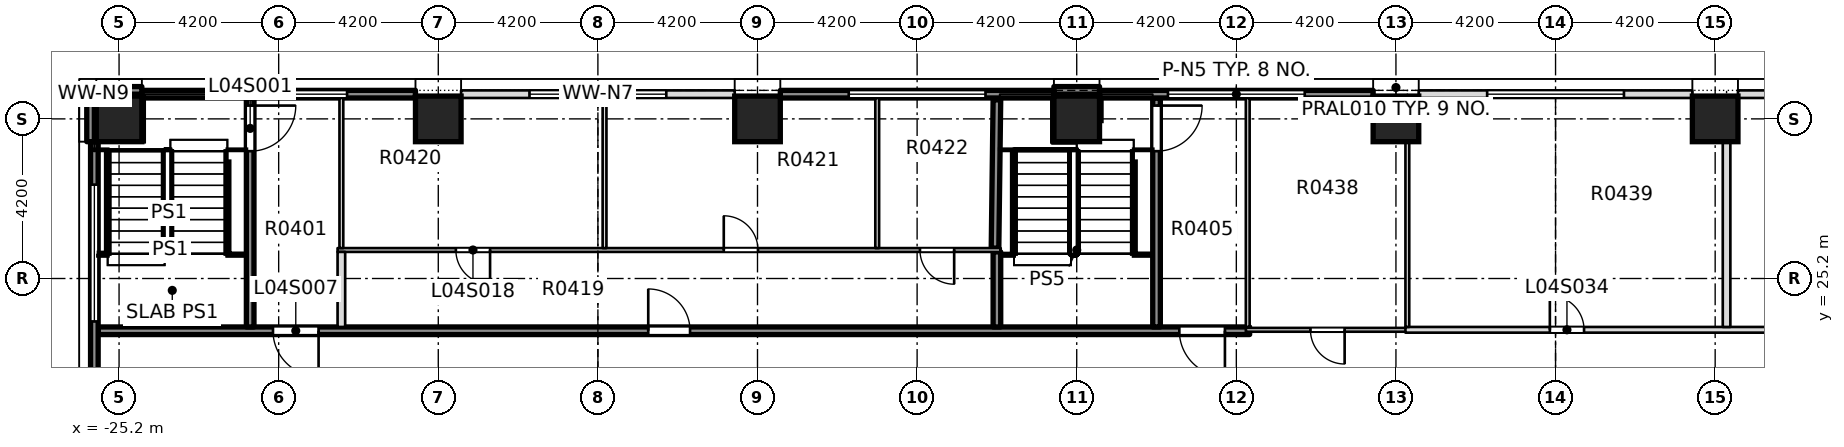
"""IFC4 building model, lengths in metres.
Left out: names, types, materials, properties, quantities, classifications, styles, units other than length and angle.
Written with IfcOpenShell. Run it as: python <this file> out.ifc"""

import sys

from ifc_helpers import new_model, si_unit, direction, frame, frame_2d, origin, origin_2d, place, context, subcontext, project, spatial, rectangle, extrude, element, fill, save


model = new_model("IFC4")
c1 = context("Model", 3, precision=1e-05, world=origin(), true_north=direction((0.0, 1.0)))
c2 = subcontext(c1, "Body", "Model", "MODEL_VIEW")
j1 = project(units=[si_unit("LENGTHUNIT", "METRE"), si_unit("PLANEANGLEUNIT", "RADIAN")], contexts=[c1])
p1 = place(None, origin())
s1 = spatial("IfcSite", under=j1, at=p1, CompositionType="ELEMENT")
p2 = place(p1, origin())
s2 = spatial("IfcBuilding", under=s1, at=p2, CompositionType="ELEMENT")
p3 = place(p2, frame((0.0, 0.0, 25.0)))
s3 = spatial("IfcBuildingStorey", under=s2, at=p3, CompositionType="ELEMENT", Elevation=25.0)
for number, where, z_axis, x_axis in (
    (1, (-25.2, 29.4, 0.0), (0.0, 0.0, 1.0), (1.0, 0.0, 0.0)),
    (2, (-16.8, 29.4, 0.0), (0.0, 0.0, 1.0), (1.0, 0.0, 0.0)),
    (3, (-8.4, 29.4, 0.0), (0.0, 0.0, 1.0), (1.0, 0.0, 0.0)),
    (4, (0.0, 29.4, 0.0), (0.0, 0.0, 1.0), (1.0, 0.0, 0.0)),
    (5, (8.4, 29.4, 0.0), (0.0, 0.0, 1.0), (1.0, 0.0, 0.0)),
    (6, (16.8, 29.4, 0.0), (0.0, 0.0, 1.0), (1.0, 0.0, 0.0)),
):
    element("IfcColumn", number, at=place(p3, frame(where, z_axis=z_axis, x_axis=x_axis)), inside=s3, PredefinedType="COLUMN", context=c2, shape_type="SweptSolid", body=[
        extrude(rectangle(XDim=1.2, YDim=1.2, at=origin_2d()), origin(), (0.0, 0.0, 1.0), 5.0),
    ])
p4 = place(p3, frame((-25.75, 23.825, 0.0), z_axis=(0.0, 0.0, 1.0), x_axis=(1.0, 0.0, 0.0)))
e7 = element("IfcWall", 7, at=p4, inside=s3, PredefinedType="SOLIDWALL", context=c2, shape_type="SweptSolid", body=[
    extrude(rectangle(XDim=30.3, YDim=0.2, at=frame_2d((15.15, 0.0))), origin(), (0.0, 0.0, 1.0), 4.6),
])
p5 = place(p4, frame((4.6, 0.0, 0.0)))
e8 = element("IfcOpeningElement", 8, at=p5, cuts=e7, PredefinedType="OPENING", context=c2, shape_type="SweptSolid", body=[
    extrude(rectangle(XDim=1.2, YDim=2.1, at=frame_2d((0.6, 1.05))), frame((0.0, 0.11, 0.0), z_axis=(0.0, -1.0, 0.0), x_axis=(1.0, 0.0, 0.0)), (0.0, 0.0, 1.0), 0.22),
])
p6 = place(p4, frame((28.45, 0.0, 0.0)))
e9 = element("IfcOpeningElement", 9, at=p6, cuts=e7, PredefinedType="OPENING", context=c2, shape_type="SweptSolid", body=[
    extrude(rectangle(XDim=1.2, YDim=2.1, at=frame_2d((0.6, 1.05))), frame((0.0, 0.11, 0.0), z_axis=(0.0, -1.0, 0.0), x_axis=(1.0, 0.0, 0.0)), (0.0, 0.0, 1.0), 0.22),
])
p7 = place(p4, frame((14.475, 0.0, 0.0)))
e10 = element("IfcOpeningElement", 10, at=p7, cuts=e7, PredefinedType="OPENING", context=c2, shape_type="SweptSolid", body=[
    extrude(rectangle(XDim=1.1, YDim=2.1, at=frame_2d((0.55, 1.05))), frame((0.0, 0.11, 0.0), z_axis=(0.0, -1.0, 0.0), x_axis=(1.0, 0.0, 0.0)), (0.0, 0.0, 1.0), 0.22),
])
p8 = place(p3, frame((4.45, 23.85, 0.0), z_axis=(0.0, 0.0, 1.0), x_axis=(1.0, 0.0, 0.0)))
e11 = element("IfcWall", 11, at=p8, inside=s3, PredefinedType="PARTITIONING", context=c2, shape_type="SweptSolid", body=[
    extrude(rectangle(XDim=4.3, YDim=0.1, at=frame_2d((2.15, 0.0))), origin(), (0.0, 0.0, 1.0), 4.6),
])
p9 = place(p8, frame((1.7, 0.0, 0.0)))
e12 = element("IfcOpeningElement", 12, at=p9, cuts=e11, PredefinedType="OPENING", context=c2, shape_type="SweptSolid", body=[
    extrude(rectangle(XDim=0.9, YDim=2.1, at=frame_2d((0.45, 1.05))), frame((0.0, 0.06, 0.0), z_axis=(0.0, -1.0, 0.0), x_axis=(1.0, 0.0, 0.0)), (0.0, 0.0, 1.0), 0.12),
])
p10 = place(p3, frame((8.65, 23.85, 0.0), z_axis=(0.0, 0.0, 1.0), x_axis=(1.0, 0.0, 0.0)))
e13 = element("IfcWall", 13, at=p10, inside=s3, PredefinedType="PARTITIONING", context=c2, shape_type="SweptSolid", body=[
    extrude(rectangle(XDim=27.6, YDim=0.15, at=frame_2d((13.8, 0.0))), origin(), (0.0, 0.0, 1.0), 4.6),
])
p11 = place(p10, frame((3.8, 0.0, 0.0)))
e14 = element("IfcOpeningElement", 14, at=p11, cuts=e13, PredefinedType="OPENING", context=c2, shape_type="SweptSolid", body=[
    extrude(rectangle(XDim=0.9, YDim=2.1, at=frame_2d((0.45, 1.05))), frame((0.0, 0.085, 0.0), z_axis=(0.0, -1.0, 0.0), x_axis=(1.0, 0.0, 0.0)), (0.0, 0.0, 1.0), 0.17),
])
p12 = place(p10, frame((17.525, 0.0, 0.0)))
e15 = element("IfcOpeningElement", 15, at=p12, cuts=e13, PredefinedType="OPENING", context=c2, shape_type="SweptSolid", body=[
    extrude(rectangle(XDim=0.9, YDim=2.1, at=frame_2d((0.45, 1.05))), frame((0.0, 0.085, 0.0), z_axis=(0.0, -1.0, 0.0), x_axis=(1.0, 0.0, 0.0)), (0.0, 0.0, 1.0), 0.17),
])
p13 = place(p3, frame((-19.45, 25.95, 0.0), z_axis=(0.0, 0.0, 1.0), x_axis=(1.0, 0.0, 0.0)))
e16 = element("IfcWall", 16, at=p13, inside=s3, PredefinedType="PARTITIONING", context=c2, shape_type="SweptSolid", body=[
    extrude(rectangle(XDim=17.45, YDim=0.1, at=frame_2d((8.725, 0.0))), origin(), (0.0, 0.0, 1.0), 4.6),
])
p14 = place(p13, frame((3.113, 0.0, 0.0)))
e17 = element("IfcOpeningElement", 17, at=p14, cuts=e16, PredefinedType="OPENING", context=c2, shape_type="SweptSolid", body=[
    extrude(rectangle(XDim=0.9, YDim=2.1, at=frame_2d((0.45, 1.05))), frame((0.0, 0.06, 0.0), z_axis=(0.0, -1.0, 0.0), x_axis=(1.0, 0.0, 0.0)), (0.0, 0.0, 1.0), 0.12),
])
p15 = place(p13, frame((10.162, 0.0, 0.0)))
e18 = element("IfcOpeningElement", 18, at=p15, cuts=e16, PredefinedType="OPENING", context=c2, shape_type="SweptSolid", body=[
    extrude(rectangle(XDim=0.9, YDim=2.1, at=frame_2d((0.45, 1.05))), frame((0.0, 0.06, 0.0), z_axis=(0.0, -1.0, 0.0), x_axis=(1.0, 0.0, 0.0)), (0.0, 0.0, 1.0), 0.12),
])
p16 = place(p13, frame((15.325, 0.0, 0.0)))
e19 = element("IfcOpeningElement", 19, at=p16, cuts=e16, PredefinedType="OPENING", context=c2, shape_type="SweptSolid", body=[
    extrude(rectangle(XDim=0.9, YDim=2.1, at=frame_2d((0.45, 1.05))), frame((0.0, 0.06, 0.0), z_axis=(0.0, -1.0, 0.0), x_axis=(1.0, 0.0, 0.0)), (0.0, 0.0, 1.0), 0.12),
])
p17 = place(p3, frame((-21.75, 23.925, 0.0), z_axis=(0.0, 0.0, 1.0), x_axis=(0.0, 1.0, 0.0)))
e20 = element("IfcWall", 20, at=p17, inside=s3, PredefinedType="SOLIDWALL", context=c2, shape_type="SweptSolid", body=[
    extrude(rectangle(XDim=6.025, YDim=0.2, at=frame_2d((3.012, 0.0))), origin(), (0.0, 0.0, 1.0), 4.6),
])
p18 = place(p17, frame((4.625, 0.0, 0.0)))
e21 = element("IfcOpeningElement", 21, at=p18, cuts=e20, PredefinedType="OPENING", context=c2, shape_type="SweptSolid", body=[
    extrude(rectangle(XDim=1.2, YDim=2.1, at=frame_2d((0.6, 1.05))), frame((0.0, 0.11, 0.0), z_axis=(0.0, -1.0, 0.0), x_axis=(1.0, 0.0, 0.0)), (0.0, 0.0, 1.0), 0.22),
])
p19 = place(p3, frame((-19.35, 23.925, 0.0), z_axis=(0.0, 0.0, 1.0), x_axis=(0.0, 1.0, 0.0)))
e22 = element("IfcWall", 22, at=p19, inside=s3, PredefinedType="PARTITIONING", context=c2, shape_type="SweptSolid", body=[
    extrude(rectangle(XDim=1.975, YDim=0.2, at=frame_2d((0.987, 0.0))), origin(), (0.0, 0.0, 1.0), 4.6),
])
for number, where, z_axis, x_axis in (
    (23, (-19.35, 26.0, 0.0), (0.0, 0.0, 1.0), (0.0, 1.0, 0.0)),
    (24, (-12.425, 26.0, 0.0), (0.0, 0.0, 1.0), (0.0, 1.0, 0.0)),
    (25, (-5.25, 26.0, 0.0), (0.0, 0.0, 1.0), (0.0, 1.0, 0.0)),
):
    element("IfcWall", number, at=place(p3, frame(where, z_axis=z_axis, x_axis=x_axis)), inside=s3, PredefinedType="PARTITIONING", context=c2, shape_type="SweptSolid", body=[
        extrude(rectangle(XDim=3.95, YDim=0.1, at=frame_2d((1.975, 0.0))), origin(), (0.0, 0.0, 1.0), 4.6),
    ])
p20 = place(p3, frame((-2.1, 23.925, 0.0), z_axis=(0.0, 0.0, 1.0), x_axis=(0.0, 1.0, 0.0)))
e26 = element("IfcWall", 26, at=p20, inside=s3, PredefinedType="SOLIDWALL", context=c2, shape_type="SweptSolid", body=[
    extrude(rectangle(XDim=1.975, YDim=0.2, at=frame_2d((0.987, 0.0))), origin(), (0.0, 0.0, 1.0), 4.6),
])
p21 = place(p3, frame((-2.15, 26.0, 0.0), z_axis=(0.0, 0.0, 1.0), x_axis=(0.012832297537, 0.99991766268, 0.0)))
e27 = element("IfcWall", 27, at=p21, inside=s3, PredefinedType="SOLIDWALL", context=c2, shape_type="SweptSolid", body=[
    extrude(rectangle(XDim=3.9, YDim=0.2, at=frame_2d((1.95, 0.0))), origin(), (0.0, 0.0, 1.0), 4.6),
])
p22 = place(p3, frame((2.1, 23.925, 0.0), z_axis=(0.0, 0.0, 1.0), x_axis=(0.0, 1.0, 0.0)))
e28 = element("IfcWall", 28, at=p22, inside=s3, PredefinedType="SOLIDWALL", context=c2, shape_type="SweptSolid", body=[
    extrude(rectangle(XDim=6.025, YDim=0.2, at=frame_2d((3.012, 0.0))), origin(), (0.0, 0.0, 1.0), 4.6),
])
p23 = place(p22, frame((4.625, 0.0, 0.0)))
e29 = element("IfcOpeningElement", 29, at=p23, cuts=e28, PredefinedType="OPENING", context=c2, shape_type="SweptSolid", body=[
    extrude(rectangle(XDim=1.2, YDim=2.1, at=frame_2d((0.6, 1.05))), frame((0.0, 0.11, 0.0), z_axis=(0.0, -1.0, 0.0), x_axis=(1.0, 0.0, 0.0)), (0.0, 0.0, 1.0), 0.22),
])
for number, where, z_axis, x_axis in (
    (30, (4.5, 23.925, 0.0), (0.0, 0.0, 1.0), (0.0, 1.0, 0.0)),
    (31, (8.7, 23.925, 0.0), (0.0, 0.0, 1.0), (0.0, 1.0, 0.0)),
):
    element("IfcWall", number, at=place(p3, frame(where, z_axis=z_axis, x_axis=x_axis)), inside=s3, PredefinedType="PARTITIONING", context=c2, shape_type="SweptSolid", body=[
        extrude(rectangle(XDim=6.025, YDim=0.1, at=frame_2d((3.012, 0.0))), origin(), (0.0, 0.0, 1.0), 4.6),
    ])
p24 = place(p3, frame((17.1, 23.925, 0.0), z_axis=(0.0, 0.0, 1.0), x_axis=(0.0, 1.0, 0.0)))
e32 = element("IfcWall", 32, at=p24, inside=s3, PredefinedType="PARTITIONING", context=c2, shape_type="SweptSolid", body=[
    extrude(rectangle(XDim=6.025, YDim=0.2, at=frame_2d((3.012, 0.0))), origin(), (0.0, 0.0, 1.0), 4.6),
])
p25 = place(p3, frame((24.6, 30.05, 0.0), z_axis=(0.0, 0.0, 1.0), x_axis=(-1.0, 0.0, 0.0)))
e33 = element("IfcWall", 33, at=p25, inside=s3, PredefinedType="STANDARD", context=c2, shape_type="SweptSolid", body=[
    extrude(rectangle(XDim=7.2, YDim=0.2, at=frame_2d((3.6, 0.0))), origin(), (0.0, 0.0, 1.0), 4.6),
])
p26 = place(p25, frame((1.8, 0.0, 0.9)))
e34 = element("IfcOpeningElement", 34, at=p26, cuts=e33, PredefinedType="OPENING", context=c2, shape_type="SweptSolid", body=[
    extrude(rectangle(XDim=3.6, YDim=2.8, at=frame_2d((1.8, 1.4))), frame((0.0, 0.11, 0.0), z_axis=(0.0, -1.0, 0.0), x_axis=(1.0, 0.0, 0.0)), (0.0, 0.0, 1.0), 0.22),
])
p27 = place(p3, frame((16.2, 30.05, 0.0), z_axis=(0.0, 0.0, 1.0), x_axis=(-1.0, 0.0, 0.0)))
e35 = element("IfcWall", 35, at=p27, inside=s3, PredefinedType="STANDARD", context=c2, shape_type="SweptSolid", body=[
    extrude(rectangle(XDim=7.2, YDim=0.2, at=frame_2d((3.6, 0.0))), origin(), (0.0, 0.0, 1.0), 4.6),
])
p28 = place(p27, frame((1.8, 0.0, 0.9)))
e36 = element("IfcOpeningElement", 36, at=p28, cuts=e35, PredefinedType="OPENING", context=c2, shape_type="SweptSolid", body=[
    extrude(rectangle(XDim=3.6, YDim=2.8, at=frame_2d((1.8, 1.4))), frame((0.0, 0.11, 0.0), z_axis=(0.0, -1.0, 0.0), x_axis=(1.0, 0.0, 0.0)), (0.0, 0.0, 1.0), 0.22),
])
p29 = place(p3, frame((0.6, 30.05, 0.0), z_axis=(0.0, 0.0, 1.0), x_axis=(1.0, 0.0, 0.0)))
e37 = element("IfcWall", 37, at=p29, inside=s3, PredefinedType="SOLIDWALL", context=c2, shape_type="SweptSolid", body=[
    extrude(rectangle(XDim=7.2, YDim=0.2, at=frame_2d((3.6, 0.0))), origin(), (0.0, 0.0, 1.0), 4.6),
])
p30 = place(p29, frame((1.8, 0.0, 0.9)))
e38 = element("IfcOpeningElement", 38, at=p30, cuts=e37, PredefinedType="OPENING", context=c2, shape_type="SweptSolid", body=[
    extrude(rectangle(XDim=3.6, YDim=2.8, at=frame_2d((1.8, 1.4))), frame((0.0, 0.11, 0.0), z_axis=(0.0, -1.0, 0.0), x_axis=(1.0, 0.0, 0.0)), (0.0, 0.0, 1.0), 0.22),
])
p31 = place(p3, frame((-7.8, 30.05, 0.0), z_axis=(0.0, 0.0, 1.0), x_axis=(1.0, 0.0, 0.0)))
e39 = element("IfcWall", 39, at=p31, inside=s3, PredefinedType="SOLIDWALL", context=c2, shape_type="SweptSolid", body=[
    extrude(rectangle(XDim=7.2, YDim=0.2, at=frame_2d((3.6, 0.0))), origin(), (0.0, 0.0, 1.0), 4.6),
])
p32 = place(p31, frame((1.8, 0.0, 0.9)))
e40 = element("IfcOpeningElement", 40, at=p32, cuts=e39, PredefinedType="OPENING", context=c2, shape_type="SweptSolid", body=[
    extrude(rectangle(XDim=3.6, YDim=2.8, at=frame_2d((1.8, 1.4))), frame((0.0, 0.11, 0.0), z_axis=(0.0, -1.0, 0.0), x_axis=(1.0, 0.0, 0.0)), (0.0, 0.0, 1.0), 0.22),
])
p33 = place(p3, frame((-9.0, 30.05, 0.0), z_axis=(0.0, 0.0, 1.0), x_axis=(-1.0, 0.0, 0.0)))
e41 = element("IfcWall", 41, at=p33, inside=s3, PredefinedType="STANDARD", context=c2, shape_type="SweptSolid", body=[
    extrude(rectangle(XDim=7.2, YDim=0.2, at=frame_2d((3.6, 0.0))), origin(), (0.0, 0.0, 1.0), 4.6),
])
p34 = place(p33, frame((1.8, 0.0, 0.9)))
e42 = element("IfcOpeningElement", 42, at=p34, cuts=e41, PredefinedType="OPENING", context=c2, shape_type="SweptSolid", body=[
    extrude(rectangle(XDim=3.6, YDim=2.8, at=frame_2d((1.8, 1.4))), frame((0.0, 0.11, 0.0), z_axis=(0.0, -1.0, 0.0), x_axis=(1.0, 0.0, 0.0)), (0.0, 0.0, 1.0), 0.22),
])
p35 = place(p3, frame((-24.6, 30.05, 0.0), z_axis=(0.0, 0.0, 1.0), x_axis=(1.0, 0.0, 0.0)))
e43 = element("IfcWall", 43, at=p35, inside=s3, PredefinedType="SOLIDWALL", context=c2, shape_type="SweptSolid", body=[
    extrude(rectangle(XDim=7.2, YDim=0.2, at=frame_2d((3.6, 0.0))), origin(), (0.0, 0.0, 1.0), 4.6),
])
p36 = place(p35, frame((1.8, 0.0, 0.9)))
e44 = element("IfcOpeningElement", 44, at=p36, cuts=e43, PredefinedType="OPENING", context=c2, shape_type="SweptSolid", body=[
    extrude(rectangle(XDim=3.6, YDim=2.8, at=frame_2d((1.8, 1.4))), frame((0.0, 0.11, 0.0), z_axis=(0.0, -1.0, 0.0), x_axis=(1.0, 0.0, 0.0)), (0.0, 0.0, 1.0), 0.22),
])
p37 = place(p3, frame((-25.8, 30.05, 0.0), z_axis=(0.0, 0.0, 1.0), x_axis=(-1.0, 0.0, 0.0)))
e45 = element("IfcWall", 45, at=p37, inside=s3, PredefinedType="STANDARD", context=c2, shape_type="SweptSolid", body=[
    extrude(rectangle(XDim=0.15, YDim=0.2, at=frame_2d((0.075, 0.0))), origin(), (0.0, 0.0, 1.0), 4.6),
])
p38 = place(p3, frame((-25.85, 21.6, 0.0), z_axis=(0.0, 0.0, 1.0), x_axis=(0.0, 1.0, 0.0)))
e46 = element("IfcWall", 46, at=p38, inside=s3, PredefinedType="SOLIDWALL", context=c2, shape_type="SweptSolid", body=[
    extrude(rectangle(XDim=7.2, YDim=0.2, at=frame_2d((3.6, 0.0))), origin(), (0.0, 0.0, 1.0), 4.6),
])
p39 = place(p38, frame((2.47, 0.0, 0.9)))
e47 = element("IfcOpeningElement", 47, at=p39, cuts=e46, PredefinedType="OPENING", context=c2, shape_type="SweptSolid", body=[
    extrude(rectangle(XDim=3.6, YDim=2.8, at=frame_2d((1.8, 1.4))), frame((0.0, 0.11, 0.0), z_axis=(0.0, -1.0, 0.0), x_axis=(1.0, 0.0, 0.0)), (0.0, 0.0, 1.0), 0.22),
])
p40 = place(p3, frame((-25.95, 28.8, 0.0), z_axis=(0.0, 0.0, 1.0), x_axis=(0.0, 1.0, 0.0)))
e48 = element("IfcWall", 48, at=p40, inside=s3, PredefinedType="SOLIDWALL", context=c2, shape_type="SweptSolid", body=[
    extrude(rectangle(XDim=1.1, YDim=0.2, at=frame_2d((0.55, 0.0))), origin(), (0.0, 0.0, 1.0), 4.6),
])
p41 = place(p3, frame((-25.8, 30.15, 0.0), z_axis=(0.0, 0.0, 1.0), x_axis=(1.0, 0.0, 0.0)))
e49 = element("IfcWall", 49, at=p41, inside=s3, PredefinedType="SOLIDWALL", context=c2, shape_type="SweptSolid", body=[
    extrude(rectangle(XDim=1.2, YDim=0.2, at=frame_2d((0.6, 0.0))), origin(), (0.0, 0.0, 1.0), 4.6),
])
p42 = place(p3, frame((-0.6, 30.15, 0.0), z_axis=(0.0, 0.0, 1.0), x_axis=(1.0, 0.0, 0.0)))
e50 = element("IfcWall", 50, at=p42, inside=s3, PredefinedType="SOLIDWALL", context=c2, shape_type="SweptSolid", body=[
    extrude(rectangle(XDim=1.2, YDim=0.2, at=frame_2d((0.6, 0.0))), origin(), (0.0, 0.0, 1.0), 4.6),
])
p43 = place(p18, origin())
e51 = element("IfcDoor", 51, at=p43, inside=s3, OperationType="DOUBLE_DOOR_SINGLE_SWING", PredefinedType="DOOR", context=c2, shape_type="SweptSolid", body=[
    extrude(rectangle(XDim=1.2, YDim=2.1, at=frame_2d((0.6, 1.05))), frame((0.0, 0.025, 0.0), z_axis=(0.0, -1.0, 0.0), x_axis=(1.0, 0.0, 0.0)), (0.0, 0.0, 1.0), 0.05),
])
fill(e21, e51)
p44 = place(p23, origin())
e52 = element("IfcDoor", 52, at=p44, inside=s3, OperationType="DOUBLE_DOOR_SINGLE_SWING", PredefinedType="DOOR", context=c2, shape_type="SweptSolid", body=[
    extrude(rectangle(XDim=1.2, YDim=2.1, at=frame_2d((0.6, 1.05))), frame((0.0, 0.025, 0.0), z_axis=(0.0, -1.0, 0.0), x_axis=(1.0, 0.0, 0.0)), (0.0, 0.0, 1.0), 0.05),
])
fill(e29, e52)
p45 = place(p5, origin())
e53 = element("IfcDoor", 53, at=p45, inside=s3, OperationType="SINGLE_SWING_LEFT", PredefinedType="DOOR", context=c2, shape_type="SweptSolid", body=[
    extrude(rectangle(XDim=1.2, YDim=2.1, at=frame_2d((0.6, 1.05))), frame((0.0, 0.025, 0.0), z_axis=(0.0, -1.0, 0.0), x_axis=(1.0, 0.0, 0.0)), (0.0, 0.0, 1.0), 0.05),
])
fill(e8, e53)
p46 = place(p6, origin())
e54 = element("IfcDoor", 54, at=p46, inside=s3, OperationType="SINGLE_SWING_RIGHT", PredefinedType="DOOR", context=c2, shape_type="SweptSolid", body=[
    extrude(rectangle(XDim=1.2, YDim=2.1, at=frame_2d((0.6, 1.05))), frame((0.0, 0.025, 0.0), z_axis=(0.0, -1.0, 0.0), x_axis=(1.0, 0.0, 0.0)), (0.0, 0.0, 1.0), 0.05),
])
fill(e9, e54)
p47 = place(p7, origin())
e55 = element("IfcDoor", 55, at=p47, inside=s3, OperationType="SINGLE_SWING_LEFT", PredefinedType="DOOR", context=c2, shape_type="SweptSolid", body=[
    extrude(rectangle(XDim=1.1, YDim=2.1, at=frame_2d((0.55, 1.05))), frame((0.0, 0.025, 0.0), z_axis=(0.0, -1.0, 0.0), x_axis=(1.0, 0.0, 0.0)), (0.0, 0.0, 1.0), 0.05),
])
fill(e10, e55)
p48 = place(p14, origin())
e56 = element("IfcDoor", 56, at=p48, inside=s3, OperationType="SINGLE_SWING_LEFT", PredefinedType="DOOR", context=c2, shape_type="SweptSolid", body=[
    extrude(rectangle(XDim=0.9, YDim=2.1, at=frame_2d((0.45, 1.05))), frame((0.0, 0.025, 0.0), z_axis=(0.0, -1.0, 0.0), x_axis=(1.0, 0.0, 0.0)), (0.0, 0.0, 1.0), 0.05),
])
fill(e17, e56)
p49 = place(p15, origin())
e57 = element("IfcDoor", 57, at=p49, inside=s3, OperationType="SINGLE_SWING_LEFT", PredefinedType="DOOR", context=c2, shape_type="SweptSolid", body=[
    extrude(rectangle(XDim=0.9, YDim=2.1, at=frame_2d((0.45, 1.05))), frame((0.0, 0.025, 0.0), z_axis=(0.0, -1.0, 0.0), x_axis=(1.0, 0.0, 0.0)), (0.0, 0.0, 1.0), 0.05),
])
fill(e18, e57)
p50 = place(p16, origin())
e58 = element("IfcDoor", 58, at=p50, inside=s3, OperationType="SINGLE_SWING_LEFT", PredefinedType="DOOR", context=c2, shape_type="SweptSolid", body=[
    extrude(rectangle(XDim=0.9, YDim=2.1, at=frame_2d((0.45, 1.05))), frame((0.0, 0.025, 0.0), z_axis=(0.0, -1.0, 0.0), x_axis=(1.0, 0.0, 0.0)), (0.0, 0.0, 1.0), 0.05),
])
fill(e19, e58)
p51 = place(p9, origin())
e59 = element("IfcDoor", 59, at=p51, inside=s3, OperationType="SINGLE_SWING_RIGHT", PredefinedType="DOOR", context=c2, shape_type="SweptSolid", body=[
    extrude(rectangle(XDim=0.9, YDim=2.1, at=frame_2d((0.45, 1.05))), frame((0.0, 0.025, 0.0), z_axis=(0.0, -1.0, 0.0), x_axis=(1.0, 0.0, 0.0)), (0.0, 0.0, 1.0), 0.05),
])
fill(e12, e59)
p52 = place(p11, origin())
e60 = element("IfcDoor", 60, at=p52, inside=s3, OperationType="SINGLE_SWING_LEFT", PredefinedType="DOOR", context=c2, shape_type="SweptSolid", body=[
    extrude(rectangle(XDim=0.9, YDim=2.1, at=frame_2d((0.45, 1.05))), frame((0.0, 0.025, 0.0), z_axis=(0.0, -1.0, 0.0), x_axis=(1.0, 0.0, 0.0)), (0.0, 0.0, 1.0), 0.05),
])
fill(e14, e60)
p53 = place(p28, origin())
e61 = element("IfcWindow", 61, at=p53, inside=s3, PartitioningType="SINGLE_PANEL", PredefinedType="WINDOW", context=c2, shape_type="SweptSolid", body=[
    extrude(rectangle(XDim=3.6, YDim=2.8, at=frame_2d((1.8, 1.4))), frame((0.0, 0.03, 0.0), z_axis=(0.0, -1.0, 0.0), x_axis=(1.0, 0.0, 0.0)), (0.0, 0.0, 1.0), 0.06),
])
fill(e36, e61)
p54 = place(p30, origin())
e62 = element("IfcWindow", 62, at=p54, inside=s3, PartitioningType="SINGLE_PANEL", PredefinedType="WINDOW", context=c2, shape_type="SweptSolid", body=[
    extrude(rectangle(XDim=3.6, YDim=2.8, at=frame_2d((1.8, 1.4))), frame((0.0, 0.03, 0.0), z_axis=(0.0, -1.0, 0.0), x_axis=(1.0, 0.0, 0.0)), (0.0, 0.0, 1.0), 0.06),
])
fill(e38, e62)
p55 = place(p32, origin())
e63 = element("IfcWindow", 63, at=p55, inside=s3, PartitioningType="SINGLE_PANEL", PredefinedType="WINDOW", context=c2, shape_type="SweptSolid", body=[
    extrude(rectangle(XDim=3.6, YDim=2.8, at=frame_2d((1.8, 1.4))), frame((0.0, 0.03, 0.0), z_axis=(0.0, -1.0, 0.0), x_axis=(1.0, 0.0, 0.0)), (0.0, 0.0, 1.0), 0.06),
])
fill(e40, e63)
p56 = place(p34, origin())
e64 = element("IfcWindow", 64, at=p56, inside=s3, PartitioningType="SINGLE_PANEL", PredefinedType="WINDOW", context=c2, shape_type="SweptSolid", body=[
    extrude(rectangle(XDim=3.6, YDim=2.8, at=frame_2d((1.8, 1.4))), frame((0.0, 0.03, 0.0), z_axis=(0.0, -1.0, 0.0), x_axis=(1.0, 0.0, 0.0)), (0.0, 0.0, 1.0), 0.06),
])
fill(e42, e64)
p57 = place(p36, origin())
e65 = element("IfcWindow", 65, at=p57, inside=s3, PartitioningType="SINGLE_PANEL", PredefinedType="WINDOW", context=c2, shape_type="SweptSolid", body=[
    extrude(rectangle(XDim=3.6, YDim=2.8, at=frame_2d((1.8, 1.4))), frame((0.0, 0.03, 0.0), z_axis=(0.0, -1.0, 0.0), x_axis=(1.0, 0.0, 0.0)), (0.0, 0.0, 1.0), 0.06),
])
fill(e44, e65)
p58 = place(p39, origin())
e66 = element("IfcWindow", 66, at=p58, inside=s3, PartitioningType="SINGLE_PANEL", PredefinedType="WINDOW", context=c2, shape_type="SweptSolid", body=[
    extrude(rectangle(XDim=3.6, YDim=2.8, at=frame_2d((1.8, 1.4))), frame((0.0, 0.03, 0.0), z_axis=(0.0, -1.0, 0.0), x_axis=(1.0, 0.0, 0.0)), (0.0, 0.0, 1.0), 0.06),
])
fill(e47, e66)
save(model, sys.argv[1])
